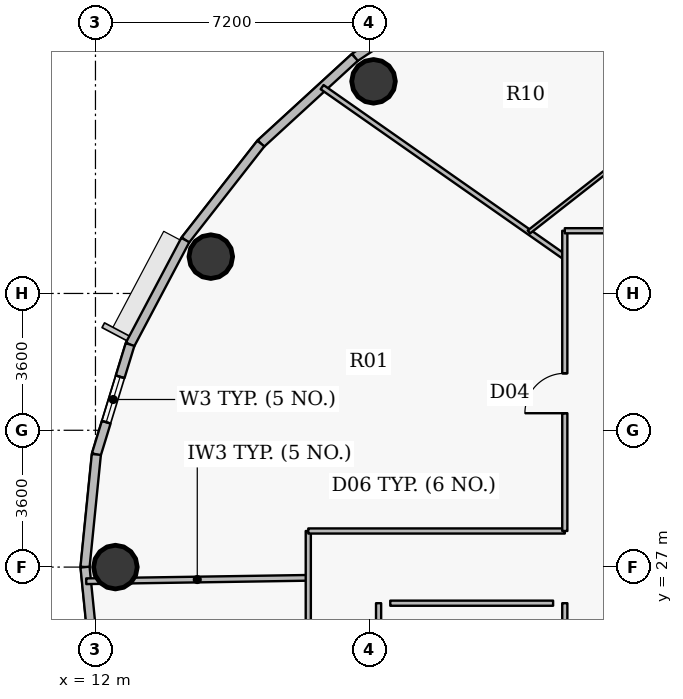
"""IFC4 building model, lengths in metres.
Left out: names, types, materials, properties, quantities, classifications, styles, units other than length and angle.
Written with IfcOpenShell. Run it as: python <this file> out.ifc"""

import sys

from ifc_helpers import new_model, si_unit, direction, frame, frame_2d, origin, origin_2d, place, context, subcontext, project, spatial, rectangle, hollow_circle, extrude, source, transform, mapped, element, fill, save


model = new_model("IFC4")
c1 = context("Model", 3, precision=1e-05, world=origin(), true_north=direction((0.0, 1.0)))
c2 = subcontext(c1, "Body", "Model", "MODEL_VIEW")
j1 = project(units=[si_unit("LENGTHUNIT", "METRE"), si_unit("PLANEANGLEUNIT", "RADIAN")], contexts=[c1])
p1 = place(None, origin())
s1 = spatial("IfcSite", under=j1, at=p1, CompositionType="ELEMENT")
p2 = place(p1, origin())
s2 = spatial("IfcBuilding", under=s1, at=p2, CompositionType="ELEMENT")
p3 = place(p2, frame((0.0, 0.0, 259.05)))
s3 = spatial("IfcBuildingStorey", under=s2, at=p3, CompositionType="ELEMENT", Elevation=259.05)
for number, where, z_axis, x_axis in (
    (1, (19.317, 39.781, 0.0), (0.0, 0.0, 1.0), (1.0, 0.0, 0.0)),
    (2, (15.035, 35.169, 0.0), (0.0, 0.0, 1.0), (1.0, 0.0, 0.0)),
    (3, (12.525, 27.0, 0.0), (0.0, 0.0, 1.0), (1.0, 0.0, 0.0)),
):
    element("IfcColumn", number, at=place(p3, frame(where, z_axis=z_axis, x_axis=x_axis)), inside=s3, PredefinedType="COLUMN", context=c2, shape_type="SweptSolid", body=[
        extrude(hollow_circle(Radius=0.575, WallThickness=0.036, at=origin_2d()), origin(), (0.0, 0.0, 1.0), 3.75),
    ])
p4 = place(p3, frame((18.824, 40.411, 0.0), z_axis=(0.0, 0.0, 1.0), x_axis=(0.831262496074, 0.555880079352, 0.0)))
e4 = element("IfcWall", 4, at=p4, inside=s3, PredefinedType="SOLIDWALL", context=c2, shape_type="SweptSolid", body=[
    extrude(rectangle(XDim=3.484, YDim=0.24, at=frame_2d((1.742, 0.0))), origin(), (0.0, 0.0, 1.0), 3.45),
])
p5 = place(p3, frame((16.352, 38.145, 0.0), z_axis=(0.0, 0.0, 1.0), x_axis=(0.737123922599, 0.675757591694, 0.0)))
e5 = element("IfcWall", 5, at=p5, inside=s3, PredefinedType="SOLIDWALL", context=c2, shape_type="SweptSolid", body=[
    extrude(rectangle(XDim=3.354, YDim=0.24, at=frame_2d((1.677, 0.0))), origin(), (0.0, 0.0, 1.0), 3.45),
])
p6 = place(p3, frame((14.364, 35.605, 0.0), z_axis=(0.0, 0.0, 1.0), x_axis=(0.616312344705, 0.787501805562, 0.0)))
e6 = element("IfcWall", 6, at=p6, inside=s3, PredefinedType="SOLIDWALL", context=c2, shape_type="SweptSolid", body=[
    extrude(rectangle(XDim=3.225, YDim=0.24, at=frame_2d((1.612, 0.0))), origin(), (0.0, 0.0, 1.0), 3.45),
])
p7 = place(p3, frame((12.91, 32.856, 0.0), z_axis=(0.0, 0.0, 1.0), x_axis=(0.46766049993, 0.883908172157, 0.0)))
e7 = element("IfcWall", 7, at=p7, inside=s3, PredefinedType="SOLIDWALL", context=c2, shape_type="SweptSolid", body=[
    extrude(rectangle(XDim=3.11, YDim=0.24, at=frame_2d((1.555, 0.0))), origin(), (0.0, 0.0, 1.0), 3.45),
])
p8 = place(p3, frame((12.023, 29.964, 0.0), z_axis=(0.0, 0.0, 1.0), x_axis=(0.293132907334, 0.95607170162, 0.0)))
e8 = element("IfcWall", 8, at=p8, inside=s3, PredefinedType="SOLIDWALL", context=c2, shape_type="SweptSolid", body=[
    extrude(rectangle(XDim=3.025, YDim=0.24, at=frame_2d((1.512, 0.0))), origin(), (0.0, 0.0, 1.0), 3.45),
])
p9 = place(p8, frame((0.887, 0.0, 0.9)))
e9 = element("IfcOpeningElement", 9, at=p9, cuts=e8, PredefinedType="OPENING", context=c2, shape_type="SweptSolid", body=[
    extrude(rectangle(XDim=1.25, YDim=1.65, at=origin_2d()), frame((0.625, 0.13, 0.825), z_axis=(0.0, -1.0, 0.0), x_axis=(1.0, 0.0, 0.0)), (0.0, 0.0, 1.0), 0.26),
])
for number, where, z_axis, x_axis in (
    (10, (11.725, 27.0, 0.0), (0.0, 0.0, 1.0), (0.1, 0.995, 0.0)),
    (11, (12.023, 24.036, 0.0), (0.0, 0.0, 1.0), (-0.1, 0.995, 0.0)),
):
    element("IfcWall", number, at=place(p3, frame(where, z_axis=z_axis, x_axis=x_axis)), inside=s3, PredefinedType="SOLIDWALL", context=c2, shape_type="SweptSolid", body=[
        extrude(rectangle(XDim=2.979, YDim=0.24, at=frame_2d((1.489, 0.0))), origin(), (0.0, 0.0, 1.0), 3.45),
    ])
p10 = place(p3, frame((11.757, 26.628, 0.0), z_axis=(0.0, 0.0, 1.0), x_axis=(0.999882437841, 0.015333313333, 0.0)))
e12 = element("IfcWall", 12, at=p10, inside=s3, PredefinedType="PARTITIONING", context=c2, shape_type="SweptSolid", body=[
    extrude(rectangle(XDim=5.844, YDim=0.15, at=frame_2d((2.922, 0.0))), origin(), (0.0, 0.0, 1.0), 2.935),
])
p11 = place(p3, frame((17.6, 23.423, 0.0), z_axis=(0.0, 0.0, 1.0), x_axis=(0.0, 1.0, 0.0)))
e13 = element("IfcWall", 13, at=p11, inside=s3, PredefinedType="PARTITIONING", context=c2, shape_type="SweptSolid", body=[
    extrude(rectangle(XDim=4.527, YDim=0.135, at=frame_2d((2.263, 0.0))), origin(), (0.0, 0.0, 1.0), 2.885),
])
p12 = place(p11, frame((1.257, 0.0, 0.0)))
e14 = element("IfcOpeningElement", 14, at=p12, cuts=e13, PredefinedType="OPENING", context=c2, shape_type="SweptSolid", body=[
    extrude(rectangle(XDim=0.82, YDim=2.1, at=origin_2d()), frame((0.41, 0.078, 1.05), z_axis=(0.0, -1.0, 0.0), x_axis=(1.0, 0.0, 0.0)), (0.0, 0.0, 1.0), 0.155),
])
p13 = place(p3, frame((17.6, 27.95, 0.0), z_axis=(0.0, 0.0, 1.0), x_axis=(1.0, 0.0, 0.0)))
e15 = element("IfcWall", 15, at=p13, inside=s3, PredefinedType="PARTITIONING", context=c2, shape_type="SweptSolid", body=[
    extrude(rectangle(XDim=6.75, YDim=0.135, at=frame_2d((3.375, 0.0))), origin(), (0.0, 0.0, 1.0), 3.45),
])
p14 = place(p3, frame((17.964, 39.629, 0.0), z_axis=(0.0, 0.0, 1.0), x_axis=(0.819162769896, -0.573561118292, 0.0)))
e16 = element("IfcWall", 16, at=p14, inside=s3, PredefinedType="PARTITIONING", context=c2, shape_type="SweptSolid", body=[
    extrude(rectangle(XDim=7.796, YDim=0.135, at=frame_2d((3.898, 0.0))), origin(), (0.0, 0.0, 1.0), 2.935),
])
p15 = place(p3, frame((23.406, 35.819, 0.0), z_axis=(0.0, 0.0, 1.0), x_axis=(0.787387506959, 0.616458363465, 0.0)))
e17 = element("IfcWall", 17, at=p15, inside=s3, PredefinedType="PARTITIONING", context=c2, shape_type="SweptSolid", body=[
    extrude(rectangle(XDim=3.245, YDim=0.1, at=frame_2d((1.623, 0.0))), origin(), (0.0, 0.0, 1.0), 2.885),
])
p16 = place(p3, frame((24.35, 27.95, 0.0), z_axis=(0.0, 0.0, 1.0), x_axis=(0.0, 1.0, 0.0)))
e18 = element("IfcWall", 18, at=p16, inside=s3, PredefinedType="PARTITIONING", context=c2, shape_type="SweptSolid", body=[
    extrude(rectangle(XDim=7.9, YDim=0.135, at=frame_2d((3.95, 0.0))), origin(), (0.0, 0.0, 1.0), 2.885),
])
p17 = place(p16, frame((3.099, 0.0, 0.0)))
e19 = element("IfcOpeningElement", 19, at=p17, cuts=e18, PredefinedType="OPENING", context=c2, shape_type="SweptSolid", body=[
    extrude(rectangle(XDim=1.05, YDim=2.15, at=origin_2d()), frame((0.525, 0.078, 1.075), z_axis=(0.0, -1.0, 0.0), x_axis=(1.0, 0.0, 0.0)), (0.0, 0.0, 1.0), 0.155),
])
p18 = place(p3, frame((24.35, 35.85, 0.0), z_axis=(0.0, 0.0, 1.0), x_axis=(1.0, 0.0, 0.0)))
e20 = element("IfcWall", 20, at=p18, inside=s3, PredefinedType="PARTITIONING", context=c2, shape_type="SweptSolid", body=[
    extrude(rectangle(XDim=26.218, YDim=0.135, at=frame_2d((13.109, 0.0))), origin(), (0.0, 0.0, 1.0), 2.885),
])
p19 = place(p18, frame((8.045, 0.0, 0.0)))
e21 = element("IfcOpeningElement", 21, at=p19, cuts=e20, PredefinedType="OPENING", context=c2, shape_type="SweptSolid", body=[
    extrude(rectangle(XDim=1.0, YDim=2.15, at=origin_2d()), frame((0.5, 0.078, 1.075), z_axis=(0.0, -1.0, 0.0), x_axis=(1.0, 0.0, 0.0)), (0.0, 0.0, 1.0), 0.155),
])
p20 = place(p3, frame((25.086, 43.95, 0.0), z_axis=(0.0, 0.0, 1.0), x_axis=(0.54137931016, -0.840778474112, 0.0)))
e22 = element("IfcWall", 22, at=p20, inside=s3, PredefinedType="PARTITIONING", context=c2, shape_type="SweptSolid", body=[
    extrude(rectangle(XDim=6.131, YDim=0.1, at=frame_2d((3.066, 0.0))), origin(), (0.0, 0.0, 1.0), 2.935),
])
p21 = place(p20, frame((2.615, 0.0, 0.0)))
e23 = element("IfcOpeningElement", 23, at=p21, cuts=e22, PredefinedType="OPENING", context=c2, shape_type="SweptSolid", body=[
    extrude(rectangle(XDim=0.9, YDim=2.1, at=origin_2d()), frame((0.45, 0.06, 1.05), z_axis=(0.0, -1.0, 0.0), x_axis=(1.0, 0.0, 0.0)), (0.0, 0.0, 1.0), 0.12),
])
p22 = place(p3, frame((19.45, 26.05, 0.0), z_axis=(0.0, 0.0, 1.0), x_axis=(0.0, -1.0, 0.0)))
e24 = element("IfcWall", 24, at=p22, inside=s3, PredefinedType="PARTITIONING", context=c2, shape_type="SweptSolid", body=[
    extrude(rectangle(XDim=2.257, YDim=0.135, at=frame_2d((1.128, 0.0))), origin(), (0.0, 0.0, 1.0), 3.45),
])
p23 = place(p3, frame((24.35, 24.745, 0.0), z_axis=(0.0, 0.0, 1.0), x_axis=(0.0, 1.0, 0.0)))
e25 = element("IfcWall", 25, at=p23, inside=s3, PredefinedType="PARTITIONING", context=c2, shape_type="SweptSolid", body=[
    extrude(rectangle(XDim=1.305, YDim=0.135, at=frame_2d((0.652, 0.0))), origin(), (0.0, 0.0, 1.0), 3.45),
])
p24 = place(p3, frame((24.042, 26.05, 0.0), z_axis=(0.0, 0.0, 1.0), x_axis=(-1.0, 0.0, 0.0)))
e26 = element("IfcWall", 26, at=p24, inside=s3, PredefinedType="PARTITIONING", context=c2, shape_type="SweptSolid", body=[
    extrude(rectangle(XDim=4.285, YDim=0.135, at=frame_2d((2.143, 0.0))), origin(), (0.0, 0.0, 1.0), 3.45),
])
m1 = source(origin(), c2, "Body", "SweptSolid", [
    extrude(rectangle(XDim=1.25, YDim=1.65, at=origin_2d()), frame((0.625, 0.03, 0.825), z_axis=(0.0, -1.0, 0.0), x_axis=(1.0, 0.0, 0.0)), (0.0, 0.0, 1.0), 0.06),
])
p25 = place(p9, origin())
e27 = element("IfcWindow", 27, at=p25, inside=s3, PartitioningType="SINGLE_PANEL", PredefinedType="WINDOW", context=c2, shape_type="MappedRepresentation", body=[
    mapped(m1, transform((0.0, 0.0, 0.0), x_axis=(1.0, 0.0, 0.0), y_axis=(0.0, 1.0, 0.0), z_axis=(0.0, 0.0, 1.0), scale=1.0)),
])
fill(e9, e27)
m2 = source(origin(), c2, "Body", "SweptSolid", [
    extrude(rectangle(XDim=1.05, YDim=2.15, at=origin_2d()), frame((0.525, 0.025, 1.075), z_axis=(0.0, -1.0, 0.0), x_axis=(1.0, 0.0, 0.0)), (0.0, 0.0, 1.0), 0.05),
])
p26 = place(p17, origin())
e28 = element("IfcDoor", 28, at=p26, inside=s3, OperationType="SINGLE_SWING_LEFT", PredefinedType="DOOR", context=c2, shape_type="MappedRepresentation", body=[
    mapped(m2, transform((0.0, 0.0, 0.0), x_axis=(1.0, 0.0, 0.0), y_axis=(0.0, 1.0, 0.0), z_axis=(0.0, 0.0, 1.0), scale=1.0)),
])
fill(e19, e28)
save(model, sys.argv[1])
